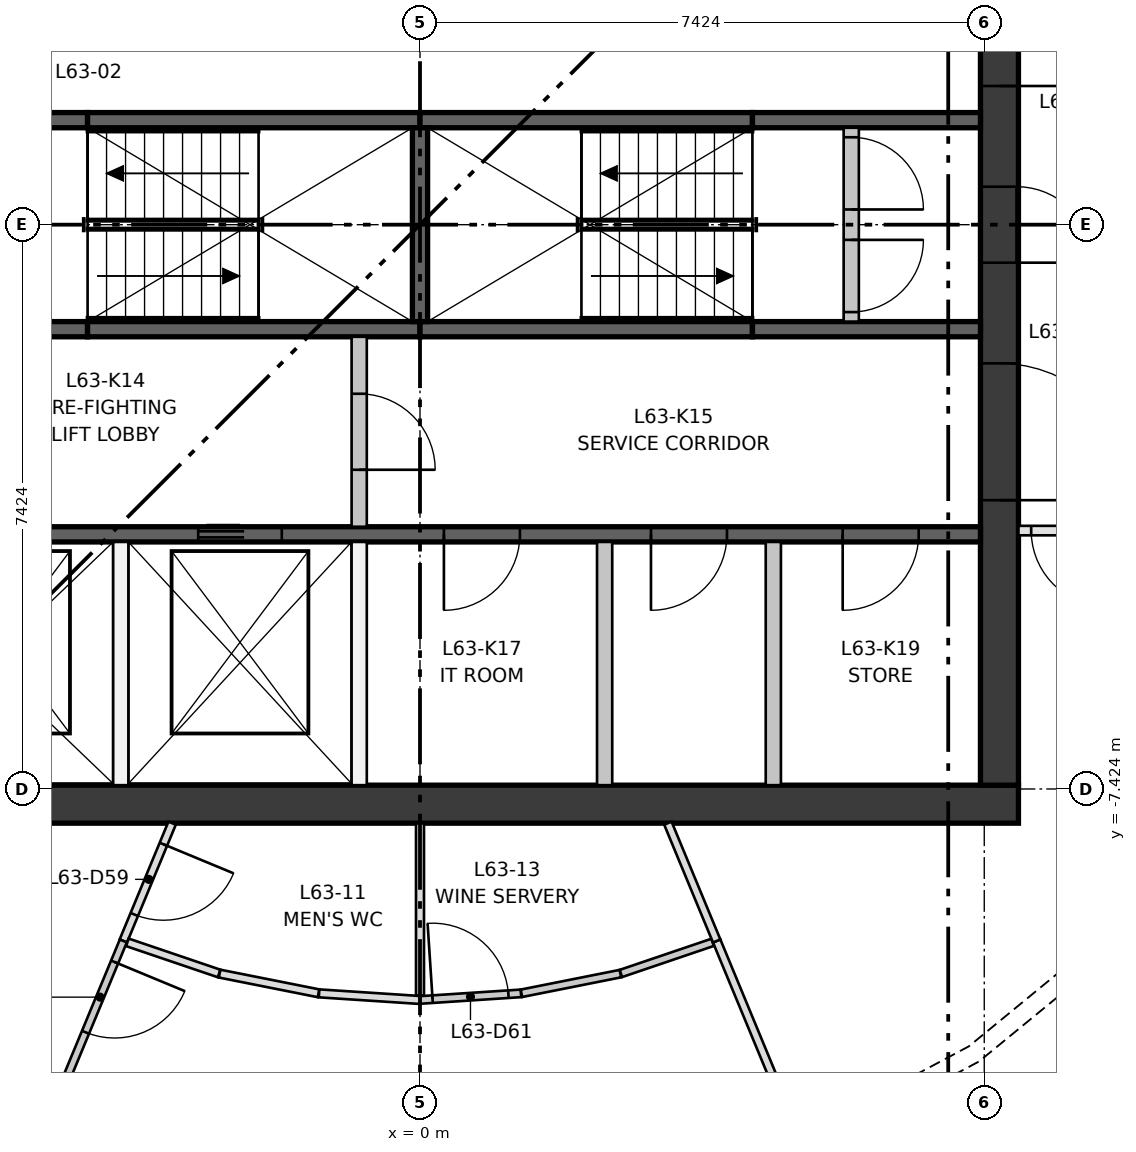
"""IFC4 building model, lengths in metres.
Left out: names, types, materials, properties, quantities, classifications, styles, units other than length and angle.
Written with IfcOpenShell. Run it as: python <this file> out.ifc"""

import sys

from ifc_helpers import new_model, si_unit, direction, frame, frame_2d, origin, place, context, subcontext, project, spatial, polyline, rectangle, outline, extrude, element, fill, save


model = new_model("IFC4")
c1 = context("Model", 3, precision=1e-05, world=origin(), true_north=direction((0.0, 1.0)))
c2 = subcontext(c1, "Body", "Model", "MODEL_VIEW")
j1 = project(units=[si_unit("LENGTHUNIT", "METRE"), si_unit("PLANEANGLEUNIT", "RADIAN")], contexts=[c1])
p1 = place(None, origin())
s1 = spatial("IfcSite", under=j1, at=p1, CompositionType="ELEMENT")
p2 = place(p1, origin())
s2 = spatial("IfcBuilding", under=s1, at=p2, CompositionType="ELEMENT")
p3 = place(p2, frame((0.0, 0.0, 231.2)))
s3 = spatial("IfcBuildingStorey", under=s2, at=p3, CompositionType="ELEMENT", Elevation=231.2)
p4 = place(p3, frame((-7.874, -7.624, 0.0), z_axis=(0.0, 0.0, 1.0), x_axis=(1.0, 0.0, 0.0)))
e1 = element("IfcWall", 1, at=p4, inside=s3, PredefinedType="SHEAR", context=c2, shape_type="SweptSolid", body=[
    extrude(rectangle(XDim=15.748, YDim=0.5, at=frame_2d((7.874, 0.0))), origin(), (0.0, 0.0, 1.0), 3.3),
])
p5 = place(p3, frame((7.624, -7.374, 0.0), z_axis=(0.0, 0.0, 1.0), x_axis=(0.0, 1.0, 0.0)))
e2 = element("IfcWall", 2, at=p5, inside=s3, PredefinedType="SHEAR", context=c2, shape_type="SweptSolid", body=[
    extrude(rectangle(XDim=14.748, YDim=0.5, at=frame_2d((7.374, 0.0))), origin(), (0.0, 0.0, 1.0), 3.3),
])
p6 = place(p5, frame((6.874, 0.0, 0.0)))
e3 = element("IfcOpeningElement", 3, at=p6, cuts=e2, PredefinedType="OPENING", context=c2, shape_type="SweptSolid", body=[
    extrude(rectangle(XDim=1.0, YDim=2.1, at=frame_2d((0.5, 1.05))), frame((0.0, 0.26, 0.0), z_axis=(0.0, -1.0, 0.0), x_axis=(1.0, 0.0, 0.0)), (0.0, 0.0, 1.0), 0.52),
])
p7 = place(p5, frame((3.75, 0.0, 0.0)))
e4 = element("IfcOpeningElement", 4, at=p7, cuts=e2, PredefinedType="OPENING", context=c2, shape_type="SweptSolid", body=[
    extrude(rectangle(XDim=1.8, YDim=2.1, at=frame_2d((0.9, 1.05))), frame((0.0, 0.26, 0.0), z_axis=(0.0, -1.0, 0.0), x_axis=(1.0, 0.0, 0.0)), (0.0, 0.0, 1.0), 0.52),
])
p8 = place(p5, frame((9.198, 0.0, 0.0)))
e5 = element("IfcOpeningElement", 5, at=p8, cuts=e2, PredefinedType="OPENING", context=c2, shape_type="SweptSolid", body=[
    extrude(rectangle(XDim=1.8, YDim=2.1, at=frame_2d((0.9, 1.05))), frame((0.0, 0.26, 0.0), z_axis=(0.0, -1.0, 0.0), x_axis=(1.0, 0.0, 0.0)), (0.0, 0.0, 1.0), 0.52),
])
p9 = place(p3, frame((-7.374, -4.074, 0.0), z_axis=(0.0, 0.0, 1.0), x_axis=(1.0, 0.0, 0.0)))
e6 = element("IfcWall", 6, at=p9, inside=s3, PredefinedType="SHEAR", context=c2, shape_type="SweptSolid", body=[
    extrude(rectangle(XDim=14.748, YDim=0.2, at=frame_2d((7.374, 0.0))), origin(), (0.0, 0.0, 1.0), 3.3),
])
p10 = place(p9, frame((1.319, 0.0, 0.0)))
e7 = element("IfcOpeningElement", 7, at=p10, cuts=e6, PredefinedType="OPENING", context=c2, shape_type="SweptSolid", body=[
    extrude(rectangle(XDim=1.1, YDim=2.1, at=frame_2d((0.55, 1.05))), frame((0.0, 0.11, 0.0), z_axis=(0.0, -1.0, 0.0), x_axis=(1.0, 0.0, 0.0)), (0.0, 0.0, 1.0), 0.22),
])
p11 = place(p9, frame((4.456, 0.0, 0.0)))
e8 = element("IfcOpeningElement", 8, at=p11, cuts=e6, PredefinedType="OPENING", context=c2, shape_type="SweptSolid", body=[
    extrude(rectangle(XDim=1.1, YDim=2.1, at=frame_2d((0.55, 1.05))), frame((0.0, 0.11, 0.0), z_axis=(0.0, -1.0, 0.0), x_axis=(1.0, 0.0, 0.0)), (0.0, 0.0, 1.0), 0.22),
])
p12 = place(p9, frame((7.689, 0.0, 0.0)))
e9 = element("IfcOpeningElement", 9, at=p12, cuts=e6, PredefinedType="OPENING", context=c2, shape_type="SweptSolid", body=[
    extrude(rectangle(XDim=1.0, YDim=2.1, at=frame_2d((0.5, 1.05))), frame((0.0, 0.11, 0.0), z_axis=(0.0, -1.0, 0.0), x_axis=(1.0, 0.0, 0.0)), (0.0, 0.0, 1.0), 0.22),
])
p13 = place(p9, frame((10.413, 0.0, 0.0)))
e10 = element("IfcOpeningElement", 10, at=p13, cuts=e6, PredefinedType="OPENING", context=c2, shape_type="SweptSolid", body=[
    extrude(rectangle(XDim=1.0, YDim=2.1, at=frame_2d((0.5, 1.05))), frame((0.0, 0.11, 0.0), z_axis=(0.0, -1.0, 0.0), x_axis=(1.0, 0.0, 0.0)), (0.0, 0.0, 1.0), 0.22),
])
p14 = place(p9, frame((12.935, 0.0, 0.0)))
e11 = element("IfcOpeningElement", 11, at=p14, cuts=e6, PredefinedType="OPENING", context=c2, shape_type="SweptSolid", body=[
    extrude(rectangle(XDim=1.0, YDim=2.1, at=frame_2d((0.5, 1.05))), frame((0.0, 0.11, 0.0), z_axis=(0.0, -1.0, 0.0), x_axis=(1.0, 0.0, 0.0)), (0.0, 0.0, 1.0), 0.22),
])
p15 = place(p3, frame((-7.374, -1.375, 0.0), z_axis=(0.0, 0.0, 1.0), x_axis=(1.0, 0.0, 0.0)))
e12 = element("IfcWall", 12, at=p15, inside=s3, PredefinedType="SHEAR", context=c2, shape_type="SweptSolid", body=[
    extrude(rectangle(XDim=3.0, YDim=0.2, at=frame_2d((1.5, 0.0))), origin(), (0.0, 0.0, 1.0), 3.3),
])
for number, where, z_axis, x_axis in (
    (13, (-4.374, -1.375, 0.0), (0.0, 0.0, 1.0), (1.0, 0.0, 0.0)),
    (14, (0.0, -1.375, 0.0), (0.0, 0.0, 1.0), (1.0, 0.0, 0.0)),
):
    element("IfcWall", number, at=place(p3, frame(where, z_axis=z_axis, x_axis=x_axis)), inside=s3, PredefinedType="SHEAR", context=c2, shape_type="SweptSolid", body=[
        extrude(rectangle(XDim=4.374, YDim=0.2, at=frame_2d((2.187, 0.0))), origin(), (0.0, 0.0, 1.0), 3.3),
    ])
for number, where, z_axis, x_axis in (
    (15, (4.374, -1.375, 0.0), (0.0, 0.0, 1.0), (1.0, 0.0, 0.0)),
    (16, (-7.374, 1.375, 0.0), (0.0, 0.0, 1.0), (1.0, 0.0, 0.0)),
):
    element("IfcWall", number, at=place(p3, frame(where, z_axis=z_axis, x_axis=x_axis)), inside=s3, PredefinedType="SHEAR", context=c2, shape_type="SweptSolid", body=[
        extrude(rectangle(XDim=3.0, YDim=0.2, at=frame_2d((1.5, 0.0))), origin(), (0.0, 0.0, 1.0), 3.3),
    ])
for number, where, z_axis, x_axis in (
    (17, (-4.374, 1.375, 0.0), (0.0, 0.0, 1.0), (1.0, 0.0, 0.0)),
    (18, (0.0, 1.375, 0.0), (0.0, 0.0, 1.0), (1.0, 0.0, 0.0)),
):
    element("IfcWall", number, at=place(p3, frame(where, z_axis=z_axis, x_axis=x_axis)), inside=s3, PredefinedType="SHEAR", context=c2, shape_type="SweptSolid", body=[
        extrude(rectangle(XDim=4.374, YDim=0.2, at=frame_2d((2.187, 0.0))), origin(), (0.0, 0.0, 1.0), 3.3),
    ])
p16 = place(p3, frame((4.374, 1.375, 0.0), z_axis=(0.0, 0.0, 1.0), x_axis=(1.0, 0.0, 0.0)))
e19 = element("IfcWall", 19, at=p16, inside=s3, PredefinedType="SHEAR", context=c2, shape_type="SweptSolid", body=[
    extrude(rectangle(XDim=3.0, YDim=0.2, at=frame_2d((1.5, 0.0))), origin(), (0.0, 0.0, 1.0), 3.3),
])
p17 = place(p3, frame((0.0, -1.275, 0.0), z_axis=(0.0, 0.0, 1.0), x_axis=(0.0, 1.0, 0.0)))
e20 = element("IfcWall", 20, at=p17, inside=s3, PredefinedType="SHEAR", context=c2, shape_type="SweptSolid", body=[
    extrude(rectangle(XDim=2.55, YDim=0.2, at=frame_2d((1.275, 0.0))), origin(), (0.0, 0.0, 1.0), 3.3),
])
for number, where, z_axis, x_axis in (
    (21, (-3.937, -7.374, 0.0), (0.0, 0.0, 1.0), (0.0, 1.0, 0.0)),
    (22, (-0.8, -7.374, 0.0), (0.0, 0.0, 1.0), (0.0, 1.0, 0.0)),
):
    element("IfcWall", number, at=place(p3, frame(where, z_axis=z_axis, x_axis=x_axis)), inside=s3, PredefinedType="PARTITIONING", context=c2, shape_type="SweptSolid", body=[
        extrude(rectangle(XDim=3.2, YDim=0.2, at=frame_2d((1.6, 0.0))), origin(), (0.0, 0.0, 1.0), 3.3),
    ])
p18 = place(p3, frame((-0.8, -3.974, 0.0), z_axis=(0.0, 0.0, 1.0), x_axis=(0.0, 1.0, 0.0)))
e23 = element("IfcWall", 23, at=p18, inside=s3, PredefinedType="PARTITIONING", context=c2, shape_type="SweptSolid", body=[
    extrude(rectangle(XDim=2.499, YDim=0.2, at=frame_2d((1.25, 0.0))), origin(), (0.0, 0.0, 1.0), 3.3),
])
p19 = place(p18, frame((0.75, 0.0, 0.0)))
e24 = element("IfcOpeningElement", 24, at=p19, cuts=e23, PredefinedType="OPENING", context=c2, shape_type="SweptSolid", body=[
    extrude(rectangle(XDim=1.0, YDim=2.1, at=frame_2d((0.5, 1.05))), frame((0.0, 0.11, 0.0), z_axis=(0.0, -1.0, 0.0), x_axis=(1.0, 0.0, 0.0)), (0.0, 0.0, 1.0), 0.22),
])
for number, where, z_axis, x_axis in (
    (25, (2.429, -7.374, 0.0), (0.0, 0.0, 1.0), (0.0, 1.0, 0.0)),
    (26, (4.649, -7.374, 0.0), (0.0, 0.0, 1.0), (0.0, 1.0, 0.0)),
):
    element("IfcWall", number, at=place(p3, frame(where, z_axis=z_axis, x_axis=x_axis)), inside=s3, PredefinedType="PARTITIONING", context=c2, shape_type="SweptSolid", body=[
        extrude(rectangle(XDim=3.2, YDim=0.2, at=frame_2d((1.6, 0.0))), origin(), (0.0, 0.0, 1.0), 3.3),
    ])
p20 = place(p3, frame((5.674, -1.275, 0.0), z_axis=(0.0, 0.0, 1.0), x_axis=(0.0, 1.0, 0.0)))
e27 = element("IfcWall", 27, at=p20, inside=s3, PredefinedType="PARTITIONING", context=c2, shape_type="SweptSolid", body=[
    extrude(rectangle(XDim=2.55, YDim=0.2, at=frame_2d((1.275, 0.0))), origin(), (0.0, 0.0, 1.0), 3.3),
])
p21 = place(p20, frame((0.125, 0.0, 0.0)))
e28 = element("IfcOpeningElement", 28, at=p21, cuts=e27, PredefinedType="OPENING", context=c2, shape_type="SweptSolid", body=[
    extrude(rectangle(XDim=0.95, YDim=2.1, at=frame_2d((0.475, 1.05))), frame((0.0, 0.11, 0.0), z_axis=(0.0, -1.0, 0.0), x_axis=(1.0, 0.0, 0.0)), (0.0, 0.0, 1.0), 0.22),
])
p22 = place(p20, frame((1.475, 0.0, 0.0)))
e29 = element("IfcOpeningElement", 29, at=p22, cuts=e27, PredefinedType="OPENING", context=c2, shape_type="SweptSolid", body=[
    extrude(rectangle(XDim=0.95, YDim=2.1, at=frame_2d((0.475, 1.05))), frame((0.0, 0.11, 0.0), z_axis=(0.0, -1.0, 0.0), x_axis=(1.0, 0.0, 0.0)), (0.0, 0.0, 1.0), 0.22),
])
p23 = place(p3, frame((8.044, -12.038, 0.0), z_axis=(0.59284076781, -0.722862546463, 0.354978257002), x_axis=(0.773221096766, 0.634136527431, -9.701072e-06)))
e30 = element("IfcWall", 30, at=p23, inside=s3, PredefinedType="SOLIDWALL", context=c2, shape_type="SweptSolid", body=[
    extrude(outline(polyline([(0.0, 0.0), (2.434, 5.551e-17), (2.417, 0.481), (0.017, 0.481), (0.0, 0.0)])), origin(), (0.0, 0.0, -1.0), 0.3),
])
p24 = place(p3, frame((9.208, -4.024, 0.0), z_axis=(0.0, 0.0, 1.0), x_axis=(-1.0, 0.0, 0.0)))
e31 = element("IfcWall", 31, at=p24, inside=s3, PredefinedType="PARTITIONING", context=c2, shape_type="SweptSolid", body=[
    extrude(rectangle(XDim=1.334, YDim=0.125, at=frame_2d((0.667, 0.0))), origin(), (0.0, 0.0, 1.0), 3.3),
])
p25 = place(p24, frame((0.167, 0.0, 0.0)))
e32 = element("IfcOpeningElement", 32, at=p25, cuts=e31, PredefinedType="OPENING", context=c2, shape_type="SweptSolid", body=[
    extrude(rectangle(XDim=1.0, YDim=2.1, at=frame_2d((0.5, 1.05))), frame((0.0, 0.073, 0.0), z_axis=(0.0, -1.0, 0.0), x_axis=(1.0, 0.0, 0.0)), (0.0, 0.0, 1.0), 0.145),
])
p26 = place(p3, frame((-3.261, -7.874, 0.0), z_axis=(0.0, 0.0, 1.0), x_axis=(-0.382681757498, -0.923880226262, 0.0)))
e33 = element("IfcWall", 33, at=p26, inside=s3, PredefinedType="PARTITIONING", context=c2, shape_type="SweptSolid", body=[
    extrude(rectangle(XDim=1.677, YDim=0.105, at=frame_2d((0.839, 0.0))), origin(), (0.0, 0.0, 1.0), 3.3),
])
p27 = place(p26, frame((0.3, 0.0, 0.0)))
e34 = element("IfcOpeningElement", 34, at=p27, cuts=e33, PredefinedType="OPENING", context=c2, shape_type="SweptSolid", body=[
    extrude(rectangle(XDim=1.0, YDim=2.1, at=frame_2d((0.5, 1.05))), frame((0.0, 0.062, 0.0), z_axis=(0.0, -1.0, 0.0), x_axis=(1.0, 0.0, 0.0)), (0.0, 0.0, 1.0), 0.125),
])
p28 = place(p3, frame((-3.903, -9.424, 0.0), z_axis=(0.0, 0.0, 1.0), x_axis=(-0.382676271808, -0.923882498479, 0.0)))
e35 = element("IfcWall", 35, at=p28, inside=s3, PredefinedType="PARTITIONING", context=c2, shape_type="SweptSolid", body=[
    extrude(rectangle(XDim=2.37, YDim=0.1, at=frame_2d((1.185, 0.0))), origin(), (0.0, 0.0, 1.0), 3.3),
])
p29 = place(p28, frame((0.3, 0.0, 0.0)))
e36 = element("IfcOpeningElement", 36, at=p29, cuts=e35, PredefinedType="OPENING", context=c2, shape_type="SweptSolid", body=[
    extrude(rectangle(XDim=1.0, YDim=2.1, at=frame_2d((0.5, 1.05))), frame((0.0, 0.06, 0.0), z_axis=(0.0, -1.0, 0.0), x_axis=(1.0, 0.0, 0.0)), (0.0, 0.0, 1.0), 0.12),
])
p30 = place(p3, frame((-2.643, -9.851, 0.0), z_axis=(0.0, 0.0, 1.0), x_axis=(-0.946945394448, 0.321394492695, 0.0)))
e37 = element("IfcWall", 37, at=p30, inside=s3, PredefinedType="PARTITIONING", context=c2, shape_type="SweptSolid", body=[
    extrude(rectangle(XDim=1.275, YDim=0.105, at=frame_2d((0.637, 0.0))), origin(), (0.0, 0.0, 1.0), 3.3),
])
p31 = place(p3, frame((-1.335, -10.112, 0.0), z_axis=(0.0, 0.0, 1.0), x_axis=(-0.980778229799, 0.195125764451, 0.0)))
e38 = element("IfcWall", 38, at=p31, inside=s3, PredefinedType="PARTITIONING", context=c2, shape_type="SweptSolid", body=[
    extrude(rectangle(XDim=1.328, YDim=0.105, at=frame_2d((0.664, 0.0))), origin(), (0.0, 0.0, 1.0), 3.3),
])
p32 = place(p3, frame((0.0, -10.2, 0.0), z_axis=(0.0, 0.0, 1.0), x_axis=(-0.997852823211, 0.065496131253, 0.0)))
e39 = element("IfcWall", 39, at=p32, inside=s3, PredefinedType="PARTITIONING", context=c2, shape_type="SweptSolid", body=[
    extrude(rectangle(XDim=1.331, YDim=0.105, at=frame_2d((0.666, 0.0))), origin(), (0.0, 0.0, 1.0), 3.3),
])
p33 = place(p3, frame((0.0, -7.874, 0.0), z_axis=(0.0, 0.0, 1.0), x_axis=(0.0, -1.0, 0.0)))
e40 = element("IfcWall", 40, at=p33, inside=s3, PredefinedType="PARTITIONING", context=c2, shape_type="SweptSolid", body=[
    extrude(rectangle(XDim=2.27, YDim=0.105, at=frame_2d((1.135, 0.0))), origin(), (0.0, 0.0, 1.0), 3.3),
])
p34 = place(p3, frame((0.0, -10.2, 0.0), z_axis=(0.0, 0.0, 1.0), x_axis=(0.997853610003, 0.065484143156, 0.0)))
e41 = element("IfcWall", 41, at=p34, inside=s3, PredefinedType="PARTITIONING", context=c2, shape_type="SweptSolid", body=[
    extrude(rectangle(XDim=1.331, YDim=0.1, at=frame_2d((0.666, 0.0))), origin(), (0.0, 0.0, 1.0), 3.3),
])
p35 = place(p34, frame((0.166, 0.0, 0.0)))
e42 = element("IfcOpeningElement", 42, at=p35, cuts=e41, PredefinedType="OPENING", context=c2, shape_type="SweptSolid", body=[
    extrude(rectangle(XDim=1.0, YDim=2.1, at=frame_2d((0.5, 1.05))), frame((0.0, 0.06, 0.0), z_axis=(0.0, -1.0, 0.0), x_axis=(1.0, 0.0, 0.0)), (0.0, 0.0, 1.0), 0.12),
])
p36 = place(p3, frame((1.335, -10.112, 0.0), z_axis=(0.0, 0.0, 1.0), x_axis=(0.980778229799, 0.195125764451, 0.0)))
e43 = element("IfcWall", 43, at=p36, inside=s3, PredefinedType="PARTITIONING", context=c2, shape_type="SweptSolid", body=[
    extrude(rectangle(XDim=1.328, YDim=0.1, at=frame_2d((0.664, 0.0))), origin(), (0.0, 0.0, 1.0), 3.3),
])
p37 = place(p3, frame((2.643, -9.851, 0.0), z_axis=(0.0, 0.0, 1.0), x_axis=(0.946984941769, 0.321277948299, 0.0)))
e44 = element("IfcWall", 44, at=p37, inside=s3, PredefinedType="PARTITIONING", context=c2, shape_type="SweptSolid", body=[
    extrude(rectangle(XDim=1.275, YDim=0.1, at=frame_2d((0.638, 0.0))), origin(), (0.0, 0.0, 1.0), 3.3),
])
p38 = place(p3, frame((3.903, -9.424, 0.0), z_axis=(0.0, 0.0, 1.0), x_axis=(0.382676271808, -0.923882498479, 0.0)))
e45 = element("IfcWall", 45, at=p38, inside=s3, PredefinedType="PARTITIONING", context=c2, shape_type="SweptSolid", body=[
    extrude(rectangle(XDim=2.37, YDim=0.105, at=frame_2d((1.185, 0.0))), origin(), (0.0, 0.0, 1.0), 3.3),
])
p39 = place(p3, frame((3.261, -7.874, 0.0), z_axis=(0.0, 0.0, 1.0), x_axis=(0.382681757498, -0.923880226262, 0.0)))
e46 = element("IfcWall", 46, at=p39, inside=s3, PredefinedType="PARTITIONING", context=c2, shape_type="SweptSolid", body=[
    extrude(rectangle(XDim=1.677, YDim=0.105, at=frame_2d((0.839, 0.0))), origin(), (0.0, 0.0, 1.0), 3.3),
])
p40 = place(p11, origin())
e47 = element("IfcDoor", 47, at=p40, inside=s3, OperationType="DOUBLE_DOOR_SLIDING", PredefinedType="DOOR", context=c2, shape_type="SweptSolid", body=[
    extrude(rectangle(XDim=1.1, YDim=2.1, at=frame_2d((0.55, 1.05))), frame((0.0, 0.025, 0.0), z_axis=(0.0, -1.0, 0.0), x_axis=(1.0, 0.0, 0.0)), (0.0, 0.0, 1.0), 0.05),
])
fill(e8, e47)
p41 = place(p21, frame((0.95, 0.0, 0.0), z_axis=(0.0, 0.0, 1.0), x_axis=(-1.0, 0.0, 0.0)))
e48 = element("IfcDoor", 48, at=p41, inside=s3, OperationType="SINGLE_SWING_RIGHT", PredefinedType="DOOR", context=c2, shape_type="SweptSolid", body=[
    extrude(rectangle(XDim=0.95, YDim=2.1, at=frame_2d((0.475, 1.05))), frame((0.0, 0.025, 0.0), z_axis=(0.0, -1.0, 0.0), x_axis=(1.0, 0.0, 0.0)), (0.0, 0.0, 1.0), 0.05),
])
fill(e28, e48)
p42 = place(p22, frame((0.95, 0.0, 0.0), z_axis=(0.0, 0.0, 1.0), x_axis=(-1.0, 0.0, 0.0)))
e49 = element("IfcDoor", 49, at=p42, inside=s3, OperationType="SINGLE_SWING_LEFT", PredefinedType="DOOR", context=c2, shape_type="SweptSolid", body=[
    extrude(rectangle(XDim=0.95, YDim=2.1, at=frame_2d((0.475, 1.05))), frame((0.0, 0.025, 0.0), z_axis=(0.0, -1.0, 0.0), x_axis=(1.0, 0.0, 0.0)), (0.0, 0.0, 1.0), 0.05),
])
fill(e29, e49)
p43 = place(p19, frame((1.0, 0.0, 0.0), z_axis=(0.0, 0.0, 1.0), x_axis=(-1.0, 0.0, 0.0)))
e50 = element("IfcDoor", 50, at=p43, inside=s3, OperationType="SINGLE_SWING_LEFT", PredefinedType="DOOR", context=c2, shape_type="SweptSolid", body=[
    extrude(rectangle(XDim=1.0, YDim=2.1, at=frame_2d((0.5, 1.05))), frame((0.0, 0.025, 0.0), z_axis=(0.0, -1.0, 0.0), x_axis=(1.0, 0.0, 0.0)), (0.0, 0.0, 1.0), 0.05),
])
fill(e24, e50)
p44 = place(p12, frame((1.0, 0.0, 0.0), z_axis=(0.0, 0.0, 1.0), x_axis=(-1.0, 0.0, 0.0)))
e51 = element("IfcDoor", 51, at=p44, inside=s3, OperationType="SINGLE_SWING_LEFT", PredefinedType="DOOR", context=c2, shape_type="SweptSolid", body=[
    extrude(rectangle(XDim=1.0, YDim=2.1, at=frame_2d((0.5, 1.05))), frame((0.0, 0.025, 0.0), z_axis=(0.0, -1.0, 0.0), x_axis=(1.0, 0.0, 0.0)), (0.0, 0.0, 1.0), 0.05),
])
fill(e9, e51)
p45 = place(p13, frame((1.0, 0.0, 0.0), z_axis=(0.0, 0.0, 1.0), x_axis=(-1.0, 0.0, 0.0)))
e52 = element("IfcDoor", 52, at=p45, inside=s3, OperationType="SINGLE_SWING_LEFT", PredefinedType="DOOR", context=c2, shape_type="SweptSolid", body=[
    extrude(rectangle(XDim=1.0, YDim=2.1, at=frame_2d((0.5, 1.05))), frame((0.0, 0.025, 0.0), z_axis=(0.0, -1.0, 0.0), x_axis=(1.0, 0.0, 0.0)), (0.0, 0.0, 1.0), 0.05),
])
fill(e10, e52)
p46 = place(p14, frame((1.0, 0.0, 0.0), z_axis=(0.0, 0.0, 1.0), x_axis=(-1.0, 0.0, 0.0)))
e53 = element("IfcDoor", 53, at=p46, inside=s3, OperationType="SINGLE_SWING_LEFT", PredefinedType="DOOR", context=c2, shape_type="SweptSolid", body=[
    extrude(rectangle(XDim=1.0, YDim=2.1, at=frame_2d((0.5, 1.05))), frame((0.0, 0.025, 0.0), z_axis=(0.0, -1.0, 0.0), x_axis=(1.0, 0.0, 0.0)), (0.0, 0.0, 1.0), 0.05),
])
fill(e11, e53)
p47 = place(p6, frame((1.0, 0.0, 0.0), z_axis=(0.0, 0.0, 1.0), x_axis=(-1.0, 0.0, 0.0)))
e54 = element("IfcDoor", 54, at=p47, inside=s3, OperationType="SINGLE_SWING_LEFT", PredefinedType="DOOR", context=c2, shape_type="SweptSolid", body=[
    extrude(rectangle(XDim=1.0, YDim=2.1, at=frame_2d((0.5, 1.05))), frame((0.0, 0.25, 0.0), z_axis=(0.0, -1.0, 0.0), x_axis=(1.0, 0.0, 0.0)), (0.0, 0.0, 1.0), 0.05),
])
fill(e3, e54)
p48 = place(p7, frame((1.8, 0.0, 0.0), z_axis=(0.0, 0.0, 1.0), x_axis=(-1.0, 0.0, 0.0)))
e55 = element("IfcDoor", 55, at=p48, inside=s3, OperationType="DOUBLE_DOOR_SINGLE_SWING", PredefinedType="DOOR", context=c2, shape_type="SweptSolid", body=[
    extrude(rectangle(XDim=1.8, YDim=2.1, at=frame_2d((0.9, 1.05))), frame((0.0, 0.025, 0.0), z_axis=(0.0, -1.0, 0.0), x_axis=(1.0, 0.0, 0.0)), (0.0, 0.0, 1.0), 0.05),
])
fill(e4, e55)
p49 = place(p8, frame((1.8, 0.0, 0.0), z_axis=(0.0, 0.0, 1.0), x_axis=(-1.0, 0.0, 0.0)))
e56 = element("IfcDoor", 56, at=p49, inside=s3, OperationType="DOUBLE_DOOR_SINGLE_SWING", PredefinedType="DOOR", context=c2, shape_type="SweptSolid", body=[
    extrude(rectangle(XDim=1.8, YDim=2.1, at=frame_2d((0.9, 1.05))), frame((0.0, 0.025, 0.0), z_axis=(0.0, -1.0, 0.0), x_axis=(1.0, 0.0, 0.0)), (0.0, 0.0, 1.0), 0.05),
])
fill(e5, e56)
p50 = place(p25, origin())
e57 = element("IfcDoor", 57, at=p50, inside=s3, OperationType="SINGLE_SWING_LEFT", PredefinedType="DOOR", context=c2, shape_type="SweptSolid", body=[
    extrude(rectangle(XDim=1.0, YDim=2.1, at=frame_2d((0.5, 1.05))), frame((0.0, 0.025, 0.0), z_axis=(0.0, -1.0, 0.0), x_axis=(1.0, 0.0, 0.0)), (0.0, 0.0, 1.0), 0.05),
])
fill(e32, e57)
p51 = place(p27, origin())
e58 = element("IfcDoor", 58, at=p51, inside=s3, OperationType="SINGLE_SWING_LEFT", PredefinedType="DOOR", context=c2, shape_type="SweptSolid", body=[
    extrude(rectangle(XDim=1.0, YDim=2.1, at=frame_2d((0.5, 1.05))), frame((0.0, 0.025, 0.0), z_axis=(0.0, -1.0, 0.0), x_axis=(1.0, 0.0, 0.0)), (0.0, 0.0, 1.0), 0.05),
])
fill(e34, e58)
p52 = place(p29, origin())
e59 = element("IfcDoor", 59, at=p52, inside=s3, OperationType="SINGLE_SWING_LEFT", PredefinedType="DOOR", context=c2, shape_type="SweptSolid", body=[
    extrude(rectangle(XDim=1.0, YDim=2.1, at=frame_2d((0.5, 1.05))), frame((0.0, 0.025, 0.0), z_axis=(0.0, -1.0, 0.0), x_axis=(1.0, 0.0, 0.0)), (0.0, 0.0, 1.0), 0.05),
])
fill(e36, e59)
p53 = place(p35, origin())
e60 = element("IfcDoor", 60, at=p53, inside=s3, OperationType="SINGLE_SWING_LEFT", PredefinedType="DOOR", context=c2, shape_type="SweptSolid", body=[
    extrude(rectangle(XDim=1.0, YDim=2.1, at=frame_2d((0.5, 1.05))), frame((0.0, 0.025, 0.0), z_axis=(0.0, -1.0, 0.0), x_axis=(1.0, 0.0, 0.0)), (0.0, 0.0, 1.0), 0.05),
])
fill(e42, e60)
save(model, sys.argv[1])
